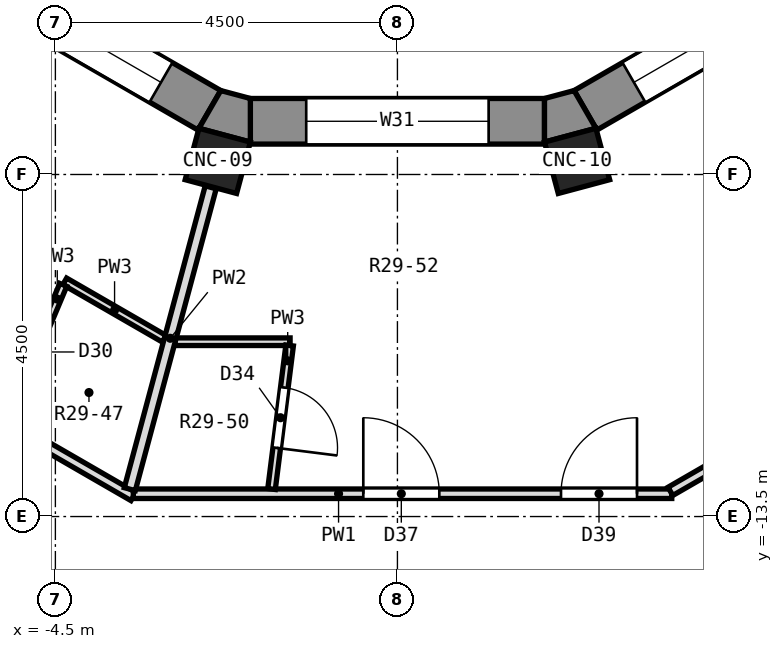
"""IFC4 building model, lengths in metres.
Left out: names, types, materials, properties, quantities, classifications, styles, units other than length and angle.
Written with IfcOpenShell. Run it as: python <this file> out.ifc"""

import sys

from ifc_helpers import new_model, si_unit, direction, frame, frame_2d, origin, origin_2d, place, context, subcontext, project, spatial, polyline, rectangle, outline, extrude, element, fill, save


model = new_model("IFC4")
c1 = context("Model", 3, precision=1e-05, world=origin(), true_north=direction((0.0, 1.0)))
c2 = subcontext(c1, "Body", "Model", "MODEL_VIEW")
j1 = project(units=[si_unit("LENGTHUNIT", "METRE"), si_unit("PLANEANGLEUNIT", "RADIAN")], contexts=[c1])
p1 = place(None, origin())
s1 = spatial("IfcSite", under=j1, at=p1, CompositionType="ELEMENT")
p2 = place(p1, origin())
s2 = spatial("IfcBuilding", under=s1, at=p2, CompositionType="ELEMENT")
p3 = place(p2, frame((0.0, 0.0, 200.4)))
s3 = spatial("IfcBuildingStorey", under=s2, at=p3, CompositionType="ELEMENT", Elevation=200.4)
for number, where, z_axis, x_axis in (
    (1, (-2.364, -8.821, 0.0), (0.0, 0.0, 1.0), (-0.259, -0.966, 0.0)),
    (2, (2.364, -8.821, 0.0), (0.0, 0.0, 1.0), (0.259, -0.966, 0.0)),
):
    element("IfcColumn", number, at=place(p3, frame(where, z_axis=z_axis, x_axis=x_axis)), inside=s3, PredefinedType="COLUMN", context=c2, shape_type="SweptSolid", body=[
        extrude(rectangle(XDim=0.7, YDim=0.7, at=origin_2d()), origin(), (0.0, 0.0, 1.0), 3.3),
    ])
p4 = place(p3, frame((-5.826, -6.22, 0.0), z_axis=(0.0, 0.0, 1.0), x_axis=(0.866005929495, -0.500033728941, 0.0)))
e3 = element("IfcWall", 3, at=p4, inside=s3, PredefinedType="SOLIDWALL", context=c2, shape_type="SweptSolid", body=[
    extrude(rectangle(XDim=3.87, YDim=0.6, at=frame_2d((1.935, 0.0))), origin(), (0.0, 0.0, 1.0), 2.85),
])
p5 = place(p4, frame((0.735, 0.0, 0.9)))
e4 = element("IfcOpeningElement", 4, at=p5, cuts=e3, PredefinedType="OPENING", context=c2, shape_type="SweptSolid", body=[
    extrude(rectangle(XDim=2.4, YDim=1.8, at=frame_2d((1.2, 0.9))), frame((0.0, 0.312, 0.0), z_axis=(0.0, -1.0, 0.0), x_axis=(1.0, 0.0, 0.0)), (0.0, 0.0, 1.0), 0.624),
])
p6 = place(p3, frame((-1.935, -8.3, 0.0), z_axis=(0.0, 0.0, 1.0), x_axis=(1.0, 0.0, 0.0)))
e5 = element("IfcWall", 5, at=p6, inside=s3, PredefinedType="SOLIDWALL", context=c2, shape_type="SweptSolid", body=[
    extrude(rectangle(XDim=3.87, YDim=0.6, at=frame_2d((1.935, 0.0))), origin(), (0.0, 0.0, 1.0), 2.85),
])
p7 = place(p6, frame((0.735, 0.0, 0.9)))
e6 = element("IfcOpeningElement", 6, at=p7, cuts=e5, PredefinedType="OPENING", context=c2, shape_type="SweptSolid", body=[
    extrude(rectangle(XDim=2.4, YDim=1.8, at=frame_2d((1.2, 0.9))), frame((0.0, 0.312, 0.0), z_axis=(0.0, -1.0, 0.0), x_axis=(1.0, 0.0, 0.0)), (0.0, 0.0, 1.0), 0.624),
])
p8 = place(p3, frame((2.474, -8.156, 0.0), z_axis=(0.0, 0.0, 1.0), x_axis=(0.866005929495, 0.500033728941, 0.0)))
e7 = element("IfcWall", 7, at=p8, inside=s3, PredefinedType="SOLIDWALL", context=c2, shape_type="SweptSolid", body=[
    extrude(rectangle(XDim=3.87, YDim=0.6, at=frame_2d((1.935, 0.0))), origin(), (0.0, 0.0, 1.0), 2.85),
])
p9 = place(p8, frame((0.735, 0.0, 0.9)))
e8 = element("IfcOpeningElement", 8, at=p9, cuts=e7, PredefinedType="OPENING", context=c2, shape_type="SweptSolid", body=[
    extrude(rectangle(XDim=2.4, YDim=1.8, at=frame_2d((1.2, 0.9))), frame((0.0, 0.312, 0.0), z_axis=(0.0, -1.0, 0.0), x_axis=(1.0, 0.0, 0.0)), (0.0, 0.0, 1.0), 0.624),
])
p10 = place(p3, origin())
e9 = element("IfcWall", 9, at=p10, inside=s3, PredefinedType="SOLIDWALL", context=c2, shape_type="SweptSolid", body=[
    extrude(outline(polyline([(-1.935, -8.573), (-1.935, -8.0), (-2.324, -7.896), (-2.611, -8.392), (-1.935, -8.573)])), origin(), (0.0, 0.0, 1.0), 2.85),
])
p11 = place(p3, origin())
e10 = element("IfcWall", 10, at=p11, inside=s3, PredefinedType="SOLIDWALL", context=c2, shape_type="SweptSolid", body=[
    extrude(outline(polyline([(2.611, -8.392), (2.324, -7.896), (1.935, -8.0), (1.935, -8.573), (2.611, -8.392)])), origin(), (0.0, 0.0, 1.0), 2.85),
])
p12 = place(p3, frame((-11.366, -11.451, 0.0), z_axis=(0.0, 0.0, 1.0), x_axis=(0.866023369196, -0.500003523994, 0.0)))
e11 = element("IfcWall", 11, at=p12, inside=s3, PredefinedType="PARTITIONING", context=c2, shape_type="SweptSolid", body=[
    extrude(rectangle(XDim=8.371, YDim=0.125, at=frame_2d((4.186, 0.0))), origin(), (0.0, 0.0, 1.0), 2.85),
])
p13 = place(p12, frame((0.966, 0.0, 0.0)))
e12 = element("IfcOpeningElement", 12, at=p13, cuts=e11, PredefinedType="OPENING", context=c2, shape_type="SweptSolid", body=[
    extrude(rectangle(XDim=0.9, YDim=2.1, at=frame_2d((0.45, 1.05))), frame((0.0, 0.074, 0.0), z_axis=(0.0, -1.0, 0.0), x_axis=(1.0, 0.0, 0.0)), (0.0, 0.0, 1.0), 0.149),
])
p14 = place(p12, frame((3.688, 0.0, 0.0)))
e13 = element("IfcOpeningElement", 13, at=p14, cuts=e11, PredefinedType="OPENING", context=c2, shape_type="SweptSolid", body=[
    extrude(rectangle(XDim=1.0, YDim=2.1, at=frame_2d((0.5, 1.05))), frame((0.0, 0.074, 0.0), z_axis=(0.0, -1.0, 0.0), x_axis=(1.0, 0.0, 0.0)), (0.0, 0.0, 1.0), 0.149),
])
p15 = place(p3, frame((-9.609, -9.694, 0.0), z_axis=(0.0, 0.0, 1.0), x_axis=(0.866017984103, -0.500012851046, 0.0)))
e14 = element("IfcWall", 14, at=p15, inside=s3, PredefinedType="PARTITIONING", context=c2, shape_type="SweptSolid", body=[
    extrude(rectangle(XDim=7.083, YDim=0.125, at=frame_2d((3.542, 0.0))), origin(), (0.0, 0.0, 1.0), 2.85),
])
p16 = place(p15, frame((2.923, 0.0, 0.0)))
e15 = element("IfcOpeningElement", 15, at=p16, cuts=e14, PredefinedType="OPENING", context=c2, shape_type="SweptSolid", body=[
    extrude(rectangle(XDim=1.0, YDim=2.1, at=frame_2d((0.5, 1.05))), frame((0.0, 0.074, 0.0), z_axis=(0.0, -1.0, 0.0), x_axis=(1.0, 0.0, 0.0)), (0.0, 0.0, 1.0), 0.149),
])
p17 = place(p3, frame((-4.377, -10.406, 0.0), z_axis=(0.0, 0.0, 1.0), x_axis=(0.86612113491, -0.499834152157, 0.0)))
e16 = element("IfcWall", 16, at=p17, inside=s3, PredefinedType="PARTITIONING", context=c2, shape_type="SweptSolid", body=[
    extrude(rectangle(XDim=1.514, YDim=0.1, at=frame_2d((0.757, 0.0))), origin(), (0.0, 0.0, 1.0), 2.85),
])
p18 = place(p3, frame((-3.475, -13.2, 0.0), z_axis=(0.0, 0.0, 1.0), x_axis=(1.0, 0.0, 0.0)))
e17 = element("IfcWall", 17, at=p18, inside=s3, PredefinedType="PARTITIONING", context=c2, shape_type="SweptSolid", body=[
    extrude(rectangle(XDim=7.084, YDim=0.125, at=frame_2d((3.542, 0.0))), origin(), (0.0, 0.0, 1.0), 2.85),
])
p19 = place(p18, frame((3.025, 0.0, 0.0)))
e18 = element("IfcOpeningElement", 18, at=p19, cuts=e17, PredefinedType="OPENING", context=c2, shape_type="SweptSolid", body=[
    extrude(rectangle(XDim=1.0, YDim=2.1, at=frame_2d((0.5, 1.05))), frame((0.0, 0.074, 0.0), z_axis=(0.0, -1.0, 0.0), x_axis=(1.0, 0.0, 0.0)), (0.0, 0.0, 1.0), 0.149),
])
p20 = place(p18, frame((5.626, 0.0, 0.0)))
e19 = element("IfcOpeningElement", 19, at=p20, cuts=e17, PredefinedType="OPENING", context=c2, shape_type="SweptSolid", body=[
    extrude(rectangle(XDim=1.0, YDim=2.1, at=frame_2d((0.5, 1.05))), frame((0.0, 0.074, 0.0), z_axis=(0.0, -1.0, 0.0), x_axis=(1.0, 0.0, 0.0)), (0.0, 0.0, 1.0), 0.149),
])
p21 = place(p3, frame((-2.926, -11.2, 0.0), z_axis=(0.0, 0.0, 1.0), x_axis=(1.0, 0.0, 0.0)))
e20 = element("IfcWall", 20, at=p21, inside=s3, PredefinedType="PARTITIONING", context=c2, shape_type="SweptSolid", body=[
    extrude(rectangle(XDim=1.514, YDim=0.1, at=frame_2d((0.757, 0.0))), origin(), (0.0, 0.0, 1.0), 2.85),
])
p22 = place(p3, frame((3.591, -13.169, 0.0), z_axis=(0.0, 0.0, 1.0), x_axis=(0.866023753919, 0.50000285764, 0.0)))
e21 = element("IfcWall", 21, at=p22, inside=s3, PredefinedType="PARTITIONING", context=c2, shape_type="SweptSolid", body=[
    extrude(rectangle(XDim=6.959, YDim=0.125, at=frame_2d((3.479, 0.0))), origin(), (0.0, 0.0, 1.0), 2.85),
])
p23 = place(p3, frame((-5.135, -12.206, 0.0), z_axis=(0.0, 0.0, 1.0), x_axis=(0.387856236325, 0.921719881495, 0.0)))
e22 = element("IfcWall", 22, at=p23, inside=s3, PredefinedType="PARTITIONING", context=c2, shape_type="SweptSolid", body=[
    extrude(rectangle(XDim=1.903, YDim=0.1, at=frame_2d((0.951, 0.0))), origin(), (0.0, 0.0, 1.0), 2.85),
])
p24 = place(p23, frame((0.545, 0.0, 0.0)))
e23 = element("IfcOpeningElement", 23, at=p24, cuts=e22, PredefinedType="OPENING", context=c2, shape_type="SweptSolid", body=[
    extrude(rectangle(XDim=0.8, YDim=2.1, at=frame_2d((0.4, 1.05))), frame((0.0, 0.062, 0.0), z_axis=(0.0, -1.0, 0.0), x_axis=(1.0, 0.0, 0.0)), (0.0, 0.0, 1.0), 0.124),
])
p25 = place(p3, frame((-3.521, -13.14, 0.0), z_axis=(0.0, 0.0, 1.0), x_axis=(0.258863724951, 0.965913853252, 0.0)))
e24 = element("IfcWall", 24, at=p25, inside=s3, PredefinedType="PARTITIONING", context=c2, shape_type="SweptSolid", body=[
    extrude(rectangle(XDim=4.111, YDim=0.15, at=frame_2d((2.056, 0.0))), origin(), (0.0, 0.0, 1.0), 2.85),
])
p26 = place(p3, frame((-1.656, -13.138, 0.0), z_axis=(0.0, 0.0, 1.0), x_axis=(0.125060808232, 0.992149078639, 0.0)))
e25 = element("IfcWall", 25, at=p26, inside=s3, PredefinedType="PARTITIONING", context=c2, shape_type="SweptSolid", body=[
    extrude(rectangle(XDim=1.903, YDim=0.1, at=frame_2d((0.952, 0.0))), origin(), (0.0, 0.0, 1.0), 2.85),
])
p27 = place(p26, frame((0.545, 0.0, 0.0)))
e26 = element("IfcOpeningElement", 26, at=p27, cuts=e25, PredefinedType="OPENING", context=c2, shape_type="SweptSolid", body=[
    extrude(rectangle(XDim=0.8, YDim=2.1, at=frame_2d((0.4, 1.05))), frame((0.0, 0.062, 0.0), z_axis=(0.0, -1.0, 0.0), x_axis=(1.0, 0.0, 0.0)), (0.0, 0.0, 1.0), 0.124),
])
p28 = place(p5, origin())
e27 = element("IfcWindow", 27, at=p28, inside=s3, PartitioningType="SINGLE_PANEL", PredefinedType="WINDOW", context=c2, shape_type="SweptSolid", body=[
    extrude(rectangle(XDim=2.4, YDim=1.8, at=frame_2d((1.2, 0.9))), frame((0.0, -0.12, 0.0), z_axis=(0.0, -1.0, 0.0), x_axis=(1.0, 0.0, 0.0)), (0.0, 0.0, 1.0), 0.06),
])
fill(e4, e27)
p29 = place(p7, origin())
e28 = element("IfcWindow", 28, at=p29, inside=s3, PartitioningType="SINGLE_PANEL", PredefinedType="WINDOW", context=c2, shape_type="SweptSolid", body=[
    extrude(rectangle(XDim=2.4, YDim=1.8, at=frame_2d((1.2, 0.9))), frame((0.0, -0.12, 0.0), z_axis=(0.0, -1.0, 0.0), x_axis=(1.0, 0.0, 0.0)), (0.0, 0.0, 1.0), 0.06),
])
fill(e6, e28)
p30 = place(p9, origin())
e29 = element("IfcWindow", 29, at=p30, inside=s3, PartitioningType="SINGLE_PANEL", PredefinedType="WINDOW", context=c2, shape_type="SweptSolid", body=[
    extrude(rectangle(XDim=2.4, YDim=1.8, at=frame_2d((1.2, 0.9))), frame((0.0, -0.12, 0.0), z_axis=(0.0, -1.0, 0.0), x_axis=(1.0, 0.0, 0.0)), (0.0, 0.0, 1.0), 0.06),
])
fill(e8, e29)
p31 = place(p27, frame((0.8, 0.0, 0.0), z_axis=(0.0, 0.0, 1.0), x_axis=(-1.0, 0.0, 0.0)))
e30 = element("IfcDoor", 30, at=p31, inside=s3, OperationType="SINGLE_SWING_RIGHT", PredefinedType="DOOR", context=c2, shape_type="SweptSolid", body=[
    extrude(rectangle(XDim=0.8, YDim=2.1, at=frame_2d((0.4, 1.05))), frame((0.0, 0.025, 0.0), z_axis=(0.0, -1.0, 0.0), x_axis=(1.0, 0.0, 0.0)), (0.0, 0.0, 1.0), 0.05),
])
fill(e26, e30)
p32 = place(p19, origin())
e31 = element("IfcDoor", 31, at=p32, inside=s3, OperationType="SINGLE_SWING_LEFT", PredefinedType="DOOR", context=c2, shape_type="SweptSolid", body=[
    extrude(rectangle(XDim=1.0, YDim=2.1, at=frame_2d((0.5, 1.05))), frame((0.0, 0.025, 0.0), z_axis=(0.0, -1.0, 0.0), x_axis=(1.0, 0.0, 0.0)), (0.0, 0.0, 1.0), 0.05),
])
fill(e18, e31)
p33 = place(p20, origin())
e32 = element("IfcDoor", 32, at=p33, inside=s3, OperationType="SINGLE_SWING_RIGHT", PredefinedType="DOOR", context=c2, shape_type="SweptSolid", body=[
    extrude(rectangle(XDim=1.0, YDim=2.1, at=frame_2d((0.5, 1.05))), frame((0.0, 0.025, 0.0), z_axis=(0.0, -1.0, 0.0), x_axis=(1.0, 0.0, 0.0)), (0.0, 0.0, 1.0), 0.05),
])
fill(e19, e32)
save(model, sys.argv[1])
